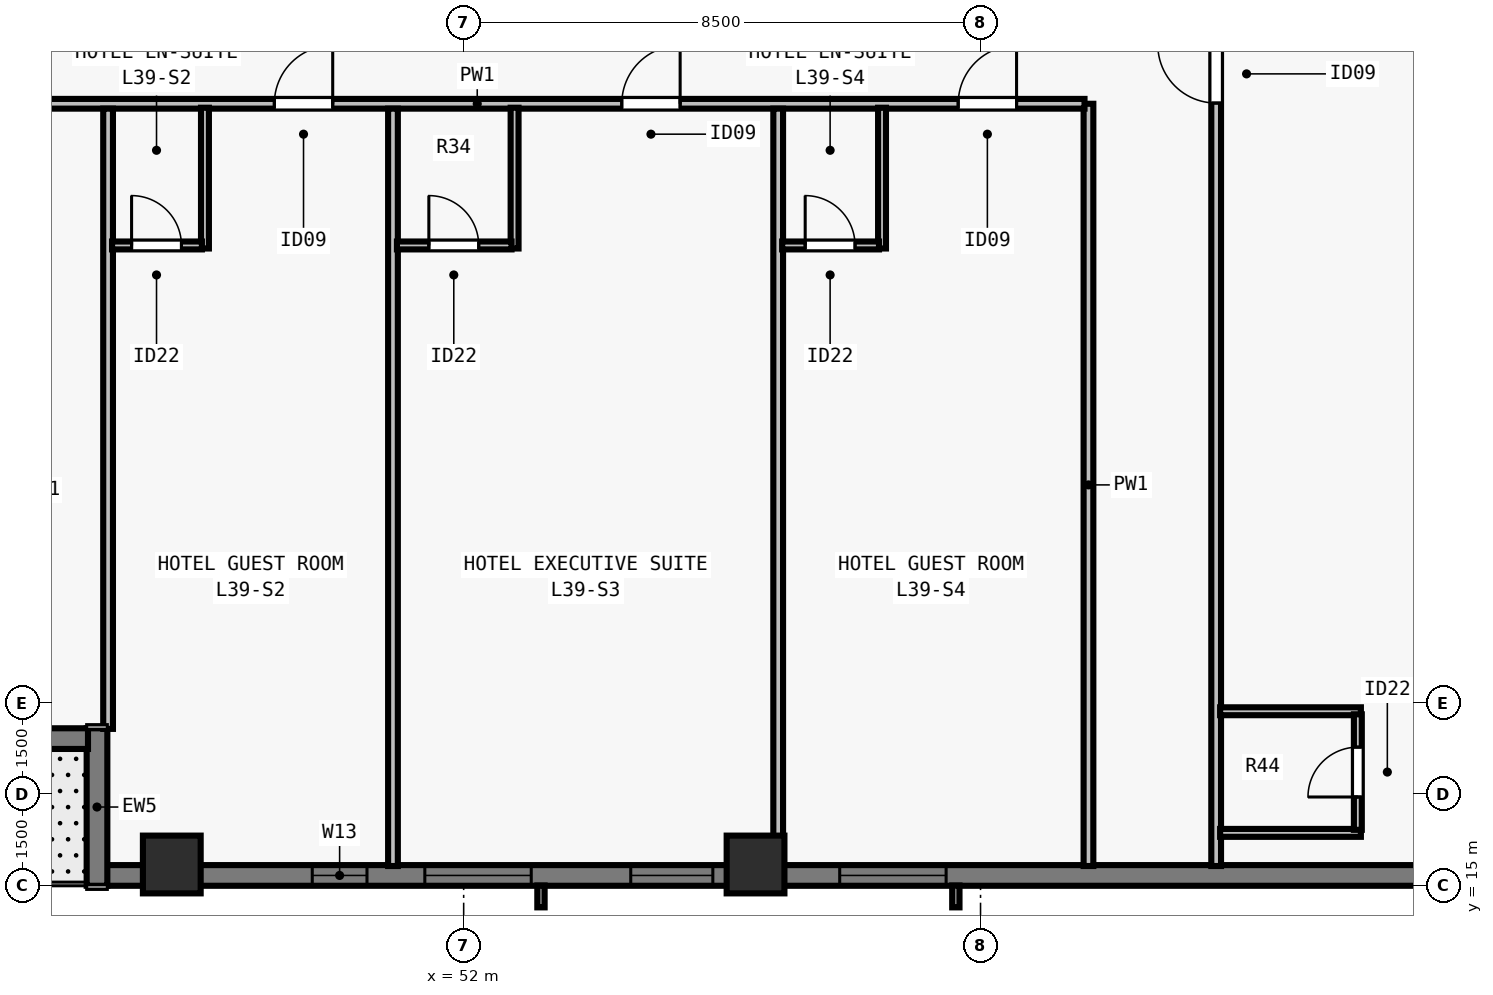
"""IFC4 building model, lengths in metres.
Left out: names, types, materials, properties, quantities, classifications, styles, units other than length and angle.
Written with IfcOpenShell. Run it as: python <this file> out.ifc"""

import sys

from ifc_helpers import new_model, si_unit, direction, frame, frame_2d, origin, origin_2d, place, context, subcontext, project, spatial, rectangle, extrude, element, fill, save


model = new_model("IFC4")
c1 = context("Model", 3, precision=1e-05, world=origin(), true_north=direction((0.0, 1.0)))
c2 = subcontext(c1, "Body", "Model", "MODEL_VIEW")
j1 = project(units=[si_unit("LENGTHUNIT", "METRE"), si_unit("PLANEANGLEUNIT", "RADIAN")], contexts=[c1])
p1 = place(None, origin())
s1 = spatial("IfcSite", under=j1, at=p1, CompositionType="ELEMENT")
p2 = place(p1, origin())
s2 = spatial("IfcBuilding", under=s1, at=p2, CompositionType="ELEMENT")
p3 = place(p2, frame((0.0, 0.0, 144.5)))
s3 = spatial("IfcBuildingStorey", under=s2, at=p3, CompositionType="ELEMENT", Elevation=144.5)
for number, where, z_axis, x_axis in (
    (1, (47.2, 15.35, 0.0), (0.0, 0.0, 1.0), (1.0, 0.0, 0.0)),
    (2, (56.8, 15.35, 0.0), (0.0, 0.0, 1.0), (1.0, 0.0, 0.0)),
):
    element("IfcColumn", number, at=place(p3, frame(where, z_axis=z_axis, x_axis=x_axis)), inside=s3, PredefinedType="COLUMN", context=c2, shape_type="SweptSolid", body=[
        extrude(rectangle(XDim=0.95, YDim=0.95, at=origin_2d()), origin(), (0.0, 0.0, 1.0), 3.5),
    ])
p4 = place(p3, frame((72.0, 15.17, 0.0), z_axis=(0.0, 0.0, 1.0), x_axis=(-1.0, 0.0, 0.0)))
e3 = element("IfcWall", 3, at=p4, inside=s3, PredefinedType="SOLIDWALL", context=c2, shape_type="SweptSolid", body=[
    extrude(rectangle(XDim=25.882, YDim=0.34, at=frame_2d((12.941, 0.0))), origin(), (0.0, 0.0, 1.0), 3.28),
])
p5 = place(p4, frame((12.066, 0.0, 0.8)))
e4 = element("IfcOpeningElement", 4, at=p5, cuts=e3, PredefinedType="OPENING", context=c2, shape_type="SweptSolid", body=[
    extrude(rectangle(XDim=1.75, YDim=1.66, at=frame_2d((0.875, 0.83))), frame((0.0, 0.18, 0.0), z_axis=(0.0, -1.0, 0.0), x_axis=(1.0, 0.0, 0.0)), (0.0, 0.0, 1.0), 0.36),
])
p6 = place(p4, frame((15.902, 0.0, 0.8)))
e5 = element("IfcOpeningElement", 5, at=p6, cuts=e3, PredefinedType="OPENING", context=c2, shape_type="SweptSolid", body=[
    extrude(rectangle(XDim=1.35, YDim=1.66, at=frame_2d((0.675, 0.83))), frame((0.0, 0.18, 0.0), z_axis=(0.0, -1.0, 0.0), x_axis=(1.0, 0.0, 0.0)), (0.0, 0.0, 1.0), 0.36),
])
p7 = place(p4, frame((18.889, 0.0, 0.8)))
e6 = element("IfcOpeningElement", 6, at=p7, cuts=e3, PredefinedType="OPENING", context=c2, shape_type="SweptSolid", body=[
    extrude(rectangle(XDim=1.75, YDim=1.66, at=frame_2d((0.875, 0.83))), frame((0.0, 0.18, 0.0), z_axis=(0.0, -1.0, 0.0), x_axis=(1.0, 0.0, 0.0)), (0.0, 0.0, 1.0), 0.36),
])
p8 = place(p4, frame((21.59, 0.0, 0.8)))
e7 = element("IfcOpeningElement", 7, at=p8, cuts=e3, PredefinedType="OPENING", context=c2, shape_type="SweptSolid", body=[
    extrude(rectangle(XDim=0.9, YDim=1.66, at=frame_2d((0.45, 0.83))), frame((0.0, 0.18, 0.0), z_axis=(0.0, -1.0, 0.0), x_axis=(1.0, 0.0, 0.0)), (0.0, 0.0, 1.0), 0.36),
])
p9 = place(p3, frame((45.97, 15.0, 0.0), z_axis=(0.0, 0.0, 1.0), x_axis=(0.0, 1.0, 0.0)))
e8 = element("IfcWall", 8, at=p9, inside=s3, PredefinedType="SOLIDWALL", context=c2, shape_type="SweptSolid", body=[
    extrude(rectangle(XDim=2.59, YDim=0.34, at=frame_2d((1.295, 0.0))), origin(), (0.0, 0.0, 1.0), 3.28),
])
p10 = place(p3, frame((45.822, 17.42, 0.0), z_axis=(0.0, 0.0, 1.0), x_axis=(-1.0, 0.0, 0.0)))
e9 = element("IfcWall", 9, at=p10, inside=s3, PredefinedType="SOLIDWALL", context=c2, shape_type="SweptSolid", body=[
    extrude(rectangle(XDim=5.762, YDim=0.34, at=frame_2d((2.881, 0.0))), origin(), (0.0, 0.0, 1.0), 3.28),
])
p11 = place(p10, frame((2.381, 0.0, 0.0)))
e10 = element("IfcOpeningElement", 10, at=p11, cuts=e9, PredefinedType="OPENING", context=c2, shape_type="SweptSolid", body=[
    extrude(rectangle(XDim=1.0, YDim=2.15, at=frame_2d((0.5, 1.075))), frame((0.0, 0.18, 0.0), z_axis=(0.0, -1.0, 0.0), x_axis=(1.0, 0.0, 0.0)), (0.0, 0.0, 1.0), 0.36),
])
p12 = place(p3, frame((64.375, 15.325, 0.0), z_axis=(0.0, 0.0, 1.0), x_axis=(0.0, 1.0, 0.0)))
e11 = element("IfcWall", 11, at=p12, inside=s3, PredefinedType="PARTITIONING", context=c2, shape_type="SweptSolid", body=[
    extrude(rectangle(XDim=47.35, YDim=0.16, at=frame_2d((23.675, 0.0))), origin(), (0.0, 0.0, 1.0), 2.555),
])
p13 = place(p12, frame((12.547, 0.0, 0.0)))
e12 = element("IfcOpeningElement", 12, at=p13, cuts=e11, PredefinedType="OPENING", context=c2, shape_type="SweptSolid", body=[
    extrude(rectangle(XDim=0.96, YDim=2.15, at=frame_2d((0.48, 1.075))), frame((0.0, 0.09, 0.0), z_axis=(0.0, -1.0, 0.0), x_axis=(1.0, 0.0, 0.0)), (0.0, 0.0, 1.0), 0.18),
])
p14 = place(p12, frame((35.902, 0.0, 0.0)))
e13 = element("IfcOpeningElement", 13, at=p14, cuts=e11, PredefinedType="OPENING", context=c2, shape_type="SweptSolid", body=[
    extrude(rectangle(XDim=0.96, YDim=2.15, at=frame_2d((0.48, 1.075))), frame((0.0, 0.09, 0.0), z_axis=(0.0, -1.0, 0.0), x_axis=(1.0, 0.0, 0.0)), (0.0, 0.0, 1.0), 0.18),
])
p15 = place(p3, frame((62.275, 15.325, 0.0), z_axis=(0.0, 0.0, 1.0), x_axis=(0.0, 1.0, 0.0)))
e14 = element("IfcWall", 14, at=p15, inside=s3, PredefinedType="PARTITIONING", context=c2, shape_type="SweptSolid", body=[
    extrude(rectangle(XDim=12.535, YDim=0.16, at=frame_2d((6.268, 0.0))), origin(), (0.0, 0.0, 1.0), 3.28),
])
p16 = place(p3, frame((40.14, 27.86, 0.0), z_axis=(0.0, 0.0, 1.0), x_axis=(1.0, 0.0, 0.0)))
e15 = element("IfcWall", 15, at=p16, inside=s3, PredefinedType="PARTITIONING", context=c2, shape_type="SweptSolid", body=[
    extrude(rectangle(XDim=22.07, YDim=0.16, at=frame_2d((11.035, 0.0))), origin(), (0.0, 0.0, 1.0), 3.28),
])
p17 = place(p16, frame((3.834, 0.0, 0.0)))
e16 = element("IfcOpeningElement", 16, at=p17, cuts=e15, PredefinedType="OPENING", context=c2, shape_type="SweptSolid", body=[
    extrude(rectangle(XDim=0.96, YDim=2.15, at=frame_2d((0.48, 1.075))), frame((0.0, 0.09, 0.0), z_axis=(0.0, -1.0, 0.0), x_axis=(1.0, 0.0, 0.0)), (0.0, 0.0, 1.0), 0.18),
])
p18 = place(p16, frame((8.746, 0.0, 0.0)))
e17 = element("IfcOpeningElement", 17, at=p18, cuts=e15, PredefinedType="OPENING", context=c2, shape_type="SweptSolid", body=[
    extrude(rectangle(XDim=0.96, YDim=2.15, at=frame_2d((0.48, 1.075))), frame((0.0, 0.09, 0.0), z_axis=(0.0, -1.0, 0.0), x_axis=(1.0, 0.0, 0.0)), (0.0, 0.0, 1.0), 0.18),
])
p19 = place(p16, frame((14.46, 0.0, 0.0)))
e18 = element("IfcOpeningElement", 18, at=p19, cuts=e15, PredefinedType="OPENING", context=c2, shape_type="SweptSolid", body=[
    extrude(rectangle(XDim=0.96, YDim=2.15, at=frame_2d((0.48, 1.075))), frame((0.0, 0.09, 0.0), z_axis=(0.0, -1.0, 0.0), x_axis=(1.0, 0.0, 0.0)), (0.0, 0.0, 1.0), 0.18),
])
p20 = place(p16, frame((19.993, 0.0, 0.0)))
e19 = element("IfcOpeningElement", 19, at=p20, cuts=e15, PredefinedType="OPENING", context=c2, shape_type="SweptSolid", body=[
    extrude(rectangle(XDim=0.96, YDim=2.15, at=frame_2d((0.48, 1.075))), frame((0.0, 0.09, 0.0), z_axis=(0.0, -1.0, 0.0), x_axis=(1.0, 0.0, 0.0)), (0.0, 0.0, 1.0), 0.18),
])
p21 = place(p3, frame((46.153, 17.58, 0.0), z_axis=(0.0, 0.0, 1.0), x_axis=(0.0, 1.0, 0.0)))
e20 = element("IfcWall", 20, at=p21, inside=s3, PredefinedType="PARTITIONING", context=c2, shape_type="SweptSolid", body=[
    extrude(rectangle(XDim=10.2, YDim=0.16, at=frame_2d((5.1, 0.0))), origin(), (0.0, 0.0, 1.0), 3.28),
])
p22 = place(p3, frame((47.745, 25.48, 0.0), z_axis=(0.0, 0.0, 1.0), x_axis=(0.0, 1.0, 0.0)))
e21 = element("IfcWall", 21, at=p22, inside=s3, PredefinedType="PLUMBINGWALL", context=c2, shape_type="SweptSolid", body=[
    extrude(rectangle(XDim=2.315, YDim=0.13, at=frame_2d((1.157, 0.0))), origin(), (0.0, 0.0, 1.0), 3.28),
])
p23 = place(p3, frame((46.218, 25.53, 0.0), z_axis=(0.0, 0.0, 1.0), x_axis=(1.0, 0.0, 0.0)))
e22 = element("IfcWall", 22, at=p23, inside=s3, PredefinedType="PLUMBINGWALL", context=c2, shape_type="SweptSolid", body=[
    extrude(rectangle(XDim=1.478, YDim=0.13, at=frame_2d((0.739, 0.0))), origin(), (0.0, 0.0, 1.0), 3.28),
])
p24 = place(p23, frame((0.321, 0.0, 0.0)))
e23 = element("IfcOpeningElement", 23, at=p24, cuts=e22, PredefinedType="OPENING", context=c2, shape_type="SweptSolid", body=[
    extrude(rectangle(XDim=0.82, YDim=2.1, at=frame_2d((0.41, 1.05))), frame((0.0, 0.075, 0.0), z_axis=(0.0, -1.0, 0.0), x_axis=(1.0, 0.0, 0.0)), (0.0, 0.0, 1.0), 0.15),
])
p25 = place(p3, frame((50.837, 15.325, 0.0), z_axis=(0.0, 0.0, 1.0), x_axis=(0.0, 1.0, 0.0)))
e24 = element("IfcWall", 24, at=p25, inside=s3, PredefinedType="PARTITIONING", context=c2, shape_type="SweptSolid", body=[
    extrude(rectangle(XDim=12.455, YDim=0.16, at=frame_2d((6.228, 0.0))), origin(), (0.0, 0.0, 1.0), 2.896),
])
p26 = place(p3, frame((52.837, 25.48, 0.0), z_axis=(0.0, 0.0, 1.0), x_axis=(0.0, 1.0, 0.0)))
e25 = element("IfcWall", 25, at=p26, inside=s3, PredefinedType="PLUMBINGWALL", context=c2, shape_type="SweptSolid", body=[
    extrude(rectangle(XDim=2.315, YDim=0.13, at=frame_2d((1.157, 0.0))), origin(), (0.0, 0.0, 1.0), 3.28),
])
p27 = place(p3, frame((50.903, 25.53, 0.0), z_axis=(0.0, 0.0, 1.0), x_axis=(1.0, 0.0, 0.0)))
e26 = element("IfcWall", 26, at=p27, inside=s3, PredefinedType="PLUMBINGWALL", context=c2, shape_type="SweptSolid", body=[
    extrude(rectangle(XDim=1.885, YDim=0.13, at=frame_2d((0.942, 0.0))), origin(), (0.0, 0.0, 1.0), 3.28),
])
p28 = place(p27, frame((0.525, 0.0, 0.0)))
e27 = element("IfcOpeningElement", 27, at=p28, cuts=e26, PredefinedType="OPENING", context=c2, shape_type="SweptSolid", body=[
    extrude(rectangle(XDim=0.82, YDim=2.1, at=frame_2d((0.41, 1.05))), frame((0.0, 0.075, 0.0), z_axis=(0.0, -1.0, 0.0), x_axis=(1.0, 0.0, 0.0)), (0.0, 0.0, 1.0), 0.15),
])
p29 = place(p3, frame((57.173, 15.325, 0.0), z_axis=(0.0, 0.0, 1.0), x_axis=(0.0, 1.0, 0.0)))
e28 = element("IfcWall", 28, at=p29, inside=s3, PredefinedType="PARTITIONING", context=c2, shape_type="SweptSolid", body=[
    extrude(rectangle(XDim=12.455, YDim=0.16, at=frame_2d((6.228, 0.0))), origin(), (0.0, 0.0, 1.0), 3.28),
])
p30 = place(p3, frame((58.88, 25.48, 0.0), z_axis=(0.0, 0.0, 1.0), x_axis=(0.0, 1.0, 0.0)))
e29 = element("IfcWall", 29, at=p30, inside=s3, PredefinedType="PLUMBINGWALL", context=c2, shape_type="SweptSolid", body=[
    extrude(rectangle(XDim=2.315, YDim=0.13, at=frame_2d((1.157, 0.0))), origin(), (0.0, 0.0, 1.0), 3.28),
])
p31 = place(p3, frame((57.238, 25.53, 0.0), z_axis=(0.0, 0.0, 1.0), x_axis=(1.0, 0.0, 0.0)))
e30 = element("IfcWall", 30, at=p31, inside=s3, PredefinedType="PLUMBINGWALL", context=c2, shape_type="SweptSolid", body=[
    extrude(rectangle(XDim=1.593, YDim=0.13, at=frame_2d((0.796, 0.0))), origin(), (0.0, 0.0, 1.0), 3.28),
])
p32 = place(p31, frame((0.379, 0.0, 0.0)))
e31 = element("IfcOpeningElement", 31, at=p32, cuts=e30, PredefinedType="OPENING", context=c2, shape_type="SweptSolid", body=[
    extrude(rectangle(XDim=0.82, YDim=2.1, at=frame_2d((0.41, 1.05))), frame((0.0, 0.075, 0.0), z_axis=(0.0, -1.0, 0.0), x_axis=(1.0, 0.0, 0.0)), (0.0, 0.0, 1.0), 0.15),
])
for number, where, z_axis, x_axis in (
    (32, (64.44, 15.87, 0.0), (0.0, 0.0, 1.0), (1.0, 0.0, 0.0)),
    (33, (64.44, 17.87, 0.0), (0.0, 0.0, 1.0), (1.0, 0.0, 0.0)),
):
    element("IfcWall", number, at=place(p3, frame(where, z_axis=z_axis, x_axis=x_axis)), inside=s3, PredefinedType="PLUMBINGWALL", context=c2, shape_type="SweptSolid", body=[
        extrude(rectangle(XDim=2.315, YDim=0.13, at=frame_2d((1.157, 0.0))), origin(), (0.0, 0.0, 1.0), 3.28),
    ])
p33 = place(p3, frame((66.705, 15.92, 0.0), z_axis=(0.0, 0.0, 1.0), x_axis=(0.0, 1.0, 0.0)))
e34 = element("IfcWall", 34, at=p33, inside=s3, PredefinedType="PLUMBINGWALL", context=c2, shape_type="SweptSolid", body=[
    extrude(rectangle(XDim=1.9, YDim=0.13, at=frame_2d((0.95, 0.0))), origin(), (0.0, 0.0, 1.0), 3.28),
])
p34 = place(p33, frame((0.54, 0.0, 0.0)))
e35 = element("IfcOpeningElement", 35, at=p34, cuts=e34, PredefinedType="OPENING", context=c2, shape_type="SweptSolid", body=[
    extrude(rectangle(XDim=0.82, YDim=2.1, at=frame_2d((0.41, 1.05))), frame((0.0, 0.075, 0.0), z_axis=(0.0, -1.0, 0.0), x_axis=(1.0, 0.0, 0.0)), (0.0, 0.0, 1.0), 0.15),
])
p35 = place(p5, origin())
e36 = element("IfcWindow", 36, at=p35, inside=s3, PartitioningType="SINGLE_PANEL", PredefinedType="WINDOW", context=c2, shape_type="SweptSolid", body=[
    extrude(rectangle(XDim=1.75, YDim=1.66, at=frame_2d((0.875, 0.83))), frame((0.0, -0.05, 0.0), z_axis=(0.0, -1.0, 0.0), x_axis=(1.0, 0.0, 0.0)), (0.0, 0.0, 1.0), 0.06),
])
fill(e4, e36)
p36 = place(p6, origin())
e37 = element("IfcWindow", 37, at=p36, inside=s3, PartitioningType="SINGLE_PANEL", PredefinedType="WINDOW", context=c2, shape_type="SweptSolid", body=[
    extrude(rectangle(XDim=1.35, YDim=1.66, at=frame_2d((0.675, 0.83))), frame((0.0, -0.05, 0.0), z_axis=(0.0, -1.0, 0.0), x_axis=(1.0, 0.0, 0.0)), (0.0, 0.0, 1.0), 0.06),
])
fill(e5, e37)
p37 = place(p7, origin())
e38 = element("IfcWindow", 38, at=p37, inside=s3, PartitioningType="SINGLE_PANEL", PredefinedType="WINDOW", context=c2, shape_type="SweptSolid", body=[
    extrude(rectangle(XDim=1.75, YDim=1.66, at=frame_2d((0.875, 0.83))), frame((0.0, -0.05, 0.0), z_axis=(0.0, -1.0, 0.0), x_axis=(1.0, 0.0, 0.0)), (0.0, 0.0, 1.0), 0.06),
])
fill(e6, e38)
p38 = place(p8, origin())
e39 = element("IfcWindow", 39, at=p38, inside=s3, PartitioningType="SINGLE_PANEL", PredefinedType="WINDOW", context=c2, shape_type="SweptSolid", body=[
    extrude(rectangle(XDim=0.9, YDim=1.66, at=frame_2d((0.45, 0.83))), frame((0.0, -0.04, 0.0), z_axis=(0.0, -1.0, 0.0), x_axis=(1.0, 0.0, 0.0)), (0.0, 0.0, 1.0), 0.06),
])
fill(e7, e39)
p39 = place(p24, origin())
e40 = element("IfcDoor", 40, at=p39, inside=s3, OperationType="SINGLE_SWING_LEFT", PredefinedType="DOOR", context=c2, shape_type="SweptSolid", body=[
    extrude(rectangle(XDim=0.82, YDim=2.1, at=frame_2d((0.41, 1.05))), frame((0.0, 0.025, 0.0), z_axis=(0.0, -1.0, 0.0), x_axis=(1.0, 0.0, 0.0)), (0.0, 0.0, 1.0), 0.05),
])
fill(e23, e40)
p40 = place(p18, origin())
e41 = element("IfcDoor", 41, at=p40, inside=s3, OperationType="SINGLE_SWING_RIGHT", PredefinedType="DOOR", context=c2, shape_type="SweptSolid", body=[
    extrude(rectangle(XDim=0.96, YDim=2.15, at=frame_2d((0.48, 1.075))), frame((0.0, 0.025, 0.0), z_axis=(0.0, -1.0, 0.0), x_axis=(1.0, 0.0, 0.0)), (0.0, 0.0, 1.0), 0.05),
])
fill(e17, e41)
p41 = place(p28, origin())
e42 = element("IfcDoor", 42, at=p41, inside=s3, OperationType="SINGLE_SWING_LEFT", PredefinedType="DOOR", context=c2, shape_type="SweptSolid", body=[
    extrude(rectangle(XDim=0.82, YDim=2.1, at=frame_2d((0.41, 1.05))), frame((0.0, 0.025, 0.0), z_axis=(0.0, -1.0, 0.0), x_axis=(1.0, 0.0, 0.0)), (0.0, 0.0, 1.0), 0.05),
])
fill(e27, e42)
p42 = place(p19, origin())
e43 = element("IfcDoor", 43, at=p42, inside=s3, OperationType="SINGLE_SWING_RIGHT", PredefinedType="DOOR", context=c2, shape_type="SweptSolid", body=[
    extrude(rectangle(XDim=0.96, YDim=2.15, at=frame_2d((0.48, 1.075))), frame((0.0, 0.025, 0.0), z_axis=(0.0, -1.0, 0.0), x_axis=(1.0, 0.0, 0.0)), (0.0, 0.0, 1.0), 0.05),
])
fill(e18, e43)
p43 = place(p32, origin())
e44 = element("IfcDoor", 44, at=p43, inside=s3, OperationType="SINGLE_SWING_LEFT", PredefinedType="DOOR", context=c2, shape_type="SweptSolid", body=[
    extrude(rectangle(XDim=0.82, YDim=2.1, at=frame_2d((0.41, 1.05))), frame((0.0, 0.025, 0.0), z_axis=(0.0, -1.0, 0.0), x_axis=(1.0, 0.0, 0.0)), (0.0, 0.0, 1.0), 0.05),
])
fill(e31, e44)
p44 = place(p20, origin())
e45 = element("IfcDoor", 45, at=p44, inside=s3, OperationType="SINGLE_SWING_RIGHT", PredefinedType="DOOR", context=c2, shape_type="SweptSolid", body=[
    extrude(rectangle(XDim=0.96, YDim=2.15, at=frame_2d((0.48, 1.075))), frame((0.0, 0.025, 0.0), z_axis=(0.0, -1.0, 0.0), x_axis=(1.0, 0.0, 0.0)), (0.0, 0.0, 1.0), 0.05),
])
fill(e19, e45)
p45 = place(p34, origin())
e46 = element("IfcDoor", 46, at=p45, inside=s3, OperationType="SINGLE_SWING_LEFT", PredefinedType="DOOR", context=c2, shape_type="SweptSolid", body=[
    extrude(rectangle(XDim=0.82, YDim=2.1, at=frame_2d((0.41, 1.05))), frame((0.0, 0.025, 0.0), z_axis=(0.0, -1.0, 0.0), x_axis=(1.0, 0.0, 0.0)), (0.0, 0.0, 1.0), 0.05),
])
fill(e35, e46)
p46 = place(p13, origin())
e47 = element("IfcDoor", 47, at=p46, inside=s3, OperationType="SINGLE_SWING_RIGHT", PredefinedType="DOOR", context=c2, shape_type="SweptSolid", body=[
    extrude(rectangle(XDim=0.96, YDim=2.15, at=frame_2d((0.48, 1.075))), frame((0.0, 0.025, 0.0), z_axis=(0.0, -1.0, 0.0), x_axis=(1.0, 0.0, 0.0)), (0.0, 0.0, 1.0), 0.05),
])
fill(e12, e47)
save(model, sys.argv[1])
